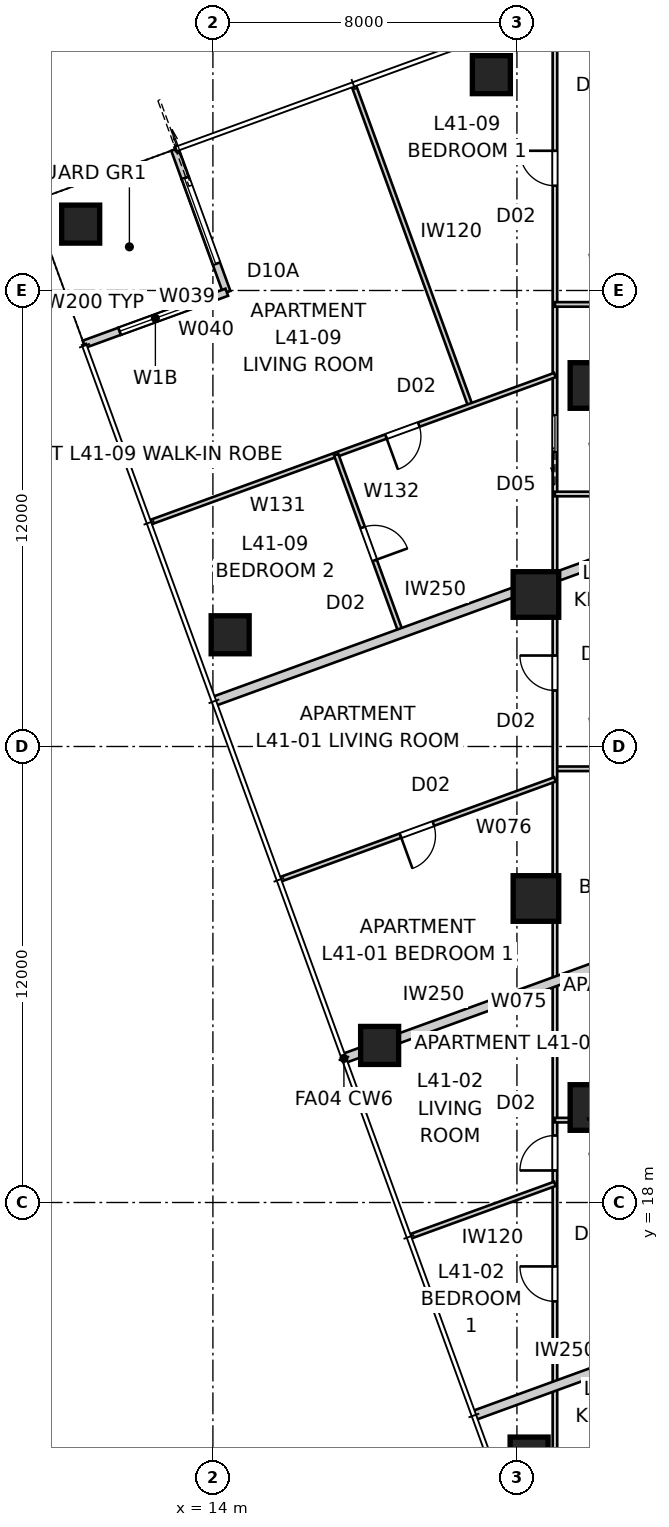
"""IFC4 building model, lengths in metres.
Left out: names, types, materials, properties, quantities, classifications, styles, units other than length and angle.
Written with IfcOpenShell. Run it as: python <this file> out.ifc"""

import sys

from ifc_helpers import new_model, si_unit, direction, frame, frame_2d, origin, origin_2d, place, context, subcontext, project, spatial, rectangle, extrude, element, fill, save


model = new_model("IFC4")
c1 = context("Model", 3, precision=1e-05, world=origin(), true_north=direction((0.0, 1.0)))
c2 = subcontext(c1, "Body", "Model", "MODEL_VIEW")
j1 = project(units=[si_unit("LENGTHUNIT", "METRE"), si_unit("PLANEANGLEUNIT", "RADIAN")], contexts=[c1])
p1 = place(None, origin())
s1 = spatial("IfcSite", under=j1, at=p1, CompositionType="ELEMENT")
p2 = place(p1, origin())
s2 = spatial("IfcBuilding", under=s1, at=p2, CompositionType="ELEMENT")
p3 = place(p2, frame((0.0, 0.0, 150.6)))
s3 = spatial("IfcBuildingStorey", under=s2, at=p3, CompositionType="ELEMENT", Elevation=150.6)
for number, where, z_axis, x_axis in (
    (1, (21.327, 47.68, 0.0), (0.0, 0.0, 1.0), (1.0, 0.0, 0.0)),
    (2, (10.521, 43.747, 0.0), (0.0, 0.0, 1.0), (1.0, 0.0, 0.0)),
    (3, (14.454, 32.94, 0.0), (0.0, 0.0, 1.0), (1.0, 0.0, 0.0)),
    (4, (18.387, 22.134, 0.0), (0.0, 0.0, 1.0), (1.0, 0.0, 0.0)),
    (5, (22.32, 11.327, 0.0), (0.0, 0.0, 1.0), (1.0, 0.0, 0.0)),
):
    element("IfcColumn", number, at=place(p3, frame(where, z_axis=z_axis, x_axis=x_axis)), inside=s3, PredefinedType="COLUMN", context=c2, shape_type="SweptSolid", body=[
        extrude(rectangle(XDim=1.0, YDim=1.0, at=origin_2d()), origin(), (0.0, 0.0, 1.0), 3.4),
    ])
for number, where, z_axis, x_axis in (
    (6, (24.0, 39.5, 0.0), (0.0, 0.0, 1.0), (1.0, 0.0, 0.0)),
    (7, (22.5, 34.0, 0.0), (0.0, 0.0, 1.0), (1.0, 0.0, 0.0)),
    (8, (22.5, 26.0, 0.0), (0.0, 0.0, 1.0), (1.0, 0.0, 0.0)),
    (9, (24.0, 20.5, 0.0), (0.0, 0.0, 1.0), (1.0, 0.0, 0.0)),
):
    element("IfcColumn", number, at=place(p3, frame(where, z_axis=z_axis, x_axis=x_axis)), inside=s3, PredefinedType="COLUMN", context=c2, shape_type="SweptSolid", body=[
        extrude(rectangle(XDim=1.2, YDim=1.2, at=origin_2d()), origin(), (0.0, 0.0, 1.0), 3.4),
    ])
p4 = place(p3, frame((12.998, 45.712, 0.0), z_axis=(0.0, 0.0, 1.0), x_axis=(0.342110593602, -0.939659694648, 0.0)))
e10 = element("IfcWall", 10, at=p4, inside=s3, PredefinedType="SOLIDWALL", context=c2, shape_type="SweptSolid", body=[
    extrude(rectangle(XDim=0.8, YDim=0.2, at=frame_2d((0.4, 0.0))), origin(), (0.0, 0.0, 1.0), 3.25),
])
p5 = place(p3, frame((13.271, 44.96, 0.0), z_axis=(0.0, 0.0, 1.0), x_axis=(0.342018703306, -0.939693144909, 0.0)))
e11 = element("IfcWall", 11, at=p5, inside=s3, PredefinedType="SOLIDWALL", context=c2, shape_type="SweptSolid", body=[
    extrude(rectangle(XDim=3.2, YDim=0.2, at=frame_2d((1.6, 0.0))), origin(), (0.0, 0.0, 1.0), 2.722),
])
p6 = place(p5, origin())
e12 = element("IfcOpeningElement", 12, at=p6, cuts=e11, PredefinedType="OPENING", context=c2, shape_type="SweptSolid", body=[
    extrude(rectangle(XDim=2.4, YDim=2.1, at=frame_2d((1.2, 1.05))), frame((0.0, 0.11, 0.0), z_axis=(0.0, -1.0, 0.0), x_axis=(1.0, 0.0, 0.0)), (0.0, 0.0, 1.0), 0.22),
])
p7 = place(p3, frame((14.366, 41.953, 0.0), z_axis=(0.0, 0.0, 1.0), x_axis=(-0.939712609717, -0.341965219194, 0.0)))
e13 = element("IfcWall", 13, at=p7, inside=s3, PredefinedType="SOLIDWALL", context=c2, shape_type="SweptSolid", body=[
    extrude(rectangle(XDim=3.0, YDim=0.2, at=frame_2d((1.5, 0.0))), origin(), (0.0, 0.0, 1.0), 2.722),
])
p8 = place(p7, frame((1.0, 0.0, 0.45)))
e14 = element("IfcOpeningElement", 14, at=p8, cuts=e13, PredefinedType="OPENING", context=c2, shape_type="SweptSolid", body=[
    extrude(rectangle(XDim=2.0, YDim=1.8, at=frame_2d((1.0, 0.9))), frame((0.0, 0.11, 0.0), z_axis=(0.0, -1.0, 0.0), x_axis=(1.0, 0.0, 0.0)), (0.0, 0.0, 1.0), 0.22),
])
p9 = place(p3, frame((11.547, 40.927, 0.0), z_axis=(0.0, 0.0, 1.0), x_axis=(-0.939686455819, -0.342037080957, 0.0)))
e15 = element("IfcWall", 15, at=p9, inside=s3, PredefinedType="SOLIDWALL", context=c2, shape_type="SweptSolid", body=[
    extrude(rectangle(XDim=1.0, YDim=0.2, at=frame_2d((0.5, 0.0))), origin(), (0.0, 0.0, 1.0), 3.25),
])
p10 = place(p3, frame((14.027, 31.188, 0.0), z_axis=(0.0, 0.0, 1.0), x_axis=(0.939692090592, 0.342021600019, 0.0)))
e16 = element("IfcWall", 16, at=p10, inside=s3, PredefinedType="PARTITIONING", context=c2, shape_type="SweptSolid", body=[
    extrude(rectangle(XDim=12.949, YDim=0.25, at=frame_2d((6.474, 0.0))), origin(), (0.0, 0.0, 1.0), 3.25),
])
p11 = place(p3, frame((17.447, 21.792, 0.0), z_axis=(0.0, 0.0, 1.0), x_axis=(0.939693071685, 0.342018904489, 0.0)))
e17 = element("IfcWall", 17, at=p11, inside=s3, PredefinedType="PARTITIONING", context=c2, shape_type="SweptSolid", body=[
    extrude(rectangle(XDim=9.309, YDim=0.25, at=frame_2d((4.654, 0.0))), origin(), (0.0, 0.0, 1.0), 3.25),
])
p12 = place(p3, frame((20.868, 12.395, 0.0), z_axis=(0.0, 0.0, 1.0), x_axis=(0.939690274876, 0.342026588591, 0.0)))
e18 = element("IfcWall", 18, at=p12, inside=s3, PredefinedType="PARTITIONING", context=c2, shape_type="SweptSolid", body=[
    extrude(rectangle(XDim=5.669, YDim=0.25, at=frame_2d((2.834, 0.0))), origin(), (0.0, 0.0, 1.0), 3.25),
])
p13 = place(p3, frame((26.2, 29.413, 0.0), z_axis=(0.0, 0.0, 1.0), x_axis=(-1.0, 0.0, 0.0)))
e19 = element("IfcWall", 19, at=p13, inside=s3, PredefinedType="PARTITIONING", context=c2, shape_type="SweptSolid", body=[
    extrude(rectangle(XDim=3.2, YDim=0.12, at=frame_2d((1.6, 0.0))), origin(), (0.0, 0.0, 1.0), 3.25),
])
p14 = place(p13, frame((1.12, 0.0, 0.0)))
e20 = element("IfcOpeningElement", 20, at=p14, cuts=e19, PredefinedType="OPENING", context=c2, shape_type="SweptSolid", body=[
    extrude(rectangle(XDim=0.96, YDim=2.1, at=frame_2d((0.48, 1.05))), frame((0.0, 0.07, 0.0), z_axis=(0.0, -1.0, 0.0), x_axis=(1.0, 0.0, 0.0)), (0.0, 0.0, 1.0), 0.14),
])
p15 = place(p3, frame((23.0, 10.8, 0.0), z_axis=(0.0, 0.0, 1.0), x_axis=(0.0, 1.0, 0.0)))
e21 = element("IfcWall", 21, at=p15, inside=s3, PredefinedType="PARTITIONING", context=c2, shape_type="SweptSolid", body=[
    extrude(rectangle(XDim=38.0, YDim=0.12, at=frame_2d((19.0, 0.0))), origin(), (0.0, 0.0, 1.0), 2.55),
])
p16 = place(p15, frame((20.674, 0.0, 0.0)))
e22 = element("IfcOpeningElement", 22, at=p16, cuts=e21, PredefinedType="OPENING", context=c2, shape_type="SweptSolid", body=[
    extrude(rectangle(XDim=0.92, YDim=2.34, at=frame_2d((0.46, 1.17))), frame((0.0, 0.07, 0.0), z_axis=(0.0, -1.0, 0.0), x_axis=(1.0, 0.0, 0.0)), (0.0, 0.0, 1.0), 0.14),
])
p17 = place(p15, frame((4.598, 0.0, 0.0)))
e23 = element("IfcOpeningElement", 23, at=p17, cuts=e21, PredefinedType="OPENING", context=c2, shape_type="SweptSolid", body=[
    extrude(rectangle(XDim=0.92, YDim=2.34, at=frame_2d((0.46, 1.17))), frame((0.0, 0.07, 0.0), z_axis=(0.0, -1.0, 0.0), x_axis=(1.0, 0.0, 0.0)), (0.0, 0.0, 1.0), 0.14),
])
p18 = place(p15, frame((8.043, 0.0, 0.0)))
e24 = element("IfcOpeningElement", 24, at=p18, cuts=e21, PredefinedType="OPENING", context=c2, shape_type="SweptSolid", body=[
    extrude(rectangle(XDim=0.92, YDim=2.34, at=frame_2d((0.46, 1.17))), frame((0.0, 0.07, 0.0), z_axis=(0.0, -1.0, 0.0), x_axis=(1.0, 0.0, 0.0)), (0.0, 0.0, 1.0), 0.14),
])
p19 = place(p15, frame((33.957, 0.0, 0.0)))
e25 = element("IfcOpeningElement", 25, at=p19, cuts=e21, PredefinedType="OPENING", context=c2, shape_type="SweptSolid", body=[
    extrude(rectangle(XDim=0.92, YDim=2.34, at=frame_2d((0.46, 1.17))), frame((0.0, 0.07, 0.0), z_axis=(0.0, -1.0, 0.0), x_axis=(1.0, 0.0, 0.0)), (0.0, 0.0, 1.0), 0.14),
])
p20 = place(p15, frame((26.957, 0.0, 0.0)))
e26 = element("IfcOpeningElement", 26, at=p20, cuts=e21, PredefinedType="OPENING", context=c2, shape_type="SweptSolid", body=[
    extrude(rectangle(XDim=0.96, YDim=2.1, at=frame_2d((0.48, 1.05))), frame((0.0, 0.07, 0.0), z_axis=(0.0, -1.0, 0.0), x_axis=(1.0, 0.0, 0.0)), (0.0, 0.0, 1.0), 0.14),
])
p21 = place(p3, frame((23.0, 29.134, 0.0), z_axis=(0.0, 0.0, 1.0), x_axis=(-0.939685835373, -0.342038785519, 0.0)))
e27 = element("IfcWall", 27, at=p21, inside=s3, PredefinedType="PARTITIONING", context=c2, shape_type="SweptSolid", body=[
    extrude(rectangle(XDim=7.689, YDim=0.12, at=frame_2d((3.844, 0.0))), origin(), (0.0, 0.0, 1.0), 3.25),
])
p22 = place(p21, frame((3.404, 0.0, 0.0)))
e28 = element("IfcOpeningElement", 28, at=p22, cuts=e27, PredefinedType="OPENING", context=c2, shape_type="SweptSolid", body=[
    extrude(rectangle(XDim=0.92, YDim=2.34, at=frame_2d((0.46, 1.17))), frame((0.0, 0.07, 0.0), z_axis=(0.0, -1.0, 0.0), x_axis=(1.0, 0.0, 0.0)), (0.0, 0.0, 1.0), 0.14),
])
p23 = place(p3, frame((23.0, 20.167, 0.0), z_axis=(0.0, 0.0, 1.0), x_axis=(1.0, 0.0, 0.0)))
e29 = element("IfcWall", 29, at=p23, inside=s3, PredefinedType="PARTITIONING", context=c2, shape_type="SweptSolid", body=[
    extrude(rectangle(XDim=3.2, YDim=0.12, at=frame_2d((1.6, 0.0))), origin(), (0.0, 0.0, 1.0), 3.25),
])
p24 = place(p23, frame((1.72, 0.0, 0.0)))
e30 = element("IfcOpeningElement", 30, at=p24, cuts=e29, PredefinedType="OPENING", context=c2, shape_type="SweptSolid", body=[
    extrude(rectangle(XDim=0.96, YDim=2.1, at=frame_2d((0.48, 1.05))), frame((0.0, 0.07, 0.0), z_axis=(0.0, -1.0, 0.0), x_axis=(1.0, 0.0, 0.0)), (0.0, 0.0, 1.0), 0.14),
])
p25 = place(p3, frame((23.0, 18.492, 0.0), z_axis=(0.0, 0.0, 1.0), x_axis=(-0.939682468191, -0.342048036063, 0.0)))
e31 = element("IfcWall", 31, at=p25, inside=s3, PredefinedType="PARTITIONING", context=c2, shape_type="SweptSolid", body=[
    extrude(rectangle(XDim=4.049, YDim=0.12, at=frame_2d((2.024, 0.0))), origin(), (0.0, 0.0, 1.0), 3.25),
])
p26 = place(p3, frame((26.2, 41.634, 0.0), z_axis=(0.0, 0.0, 1.0), x_axis=(-1.0, 0.0, 0.0)))
e32 = element("IfcWall", 32, at=p26, inside=s3, PredefinedType="PARTITIONING", context=c2, shape_type="SweptSolid", body=[
    extrude(rectangle(XDim=3.2, YDim=0.12, at=frame_2d((1.6, 0.0))), origin(), (0.0, 0.0, 1.0), 3.25),
])
p27 = place(p26, frame((1.12, 0.0, 0.0)))
e33 = element("IfcOpeningElement", 33, at=p27, cuts=e32, PredefinedType="OPENING", context=c2, shape_type="SweptSolid", body=[
    extrude(rectangle(XDim=0.96, YDim=2.1, at=frame_2d((0.48, 1.05))), frame((0.0, 0.07, 0.0), z_axis=(0.0, -1.0, 0.0), x_axis=(1.0, 0.0, 0.0)), (0.0, 0.0, 1.0), 0.14),
])
p28 = place(p3, frame((26.2, 36.645, 0.0), z_axis=(0.0, 0.0, 1.0), x_axis=(-1.0, 0.0, 0.0)))
e34 = element("IfcWall", 34, at=p28, inside=s3, PredefinedType="PARTITIONING", context=c2, shape_type="SweptSolid", body=[
    extrude(rectangle(XDim=3.2, YDim=0.12, at=frame_2d((1.6, 0.0))), origin(), (0.0, 0.0, 1.0), 3.25),
])
p29 = place(p28, frame((1.12, 0.0, 0.0)))
e35 = element("IfcOpeningElement", 35, at=p29, cuts=e34, PredefinedType="OPENING", context=c2, shape_type="SweptSolid", body=[
    extrude(rectangle(XDim=0.96, YDim=2.1, at=frame_2d((0.48, 1.05))), frame((0.0, 0.07, 0.0), z_axis=(0.0, -1.0, 0.0), x_axis=(1.0, 0.0, 0.0)), (0.0, 0.0, 1.0), 0.14),
])
p30 = place(p3, frame((17.71, 47.385, 0.0), z_axis=(0.0, 0.0, 1.0), x_axis=(0.342038393654, -0.939685978009, 0.0)))
e36 = element("IfcWall", 36, at=p30, inside=s3, PredefinedType="PARTITIONING", context=c2, shape_type="SweptSolid", body=[
    extrude(rectangle(XDim=8.96, YDim=0.12, at=frame_2d((4.48, 0.0))), origin(), (0.0, 0.0, 1.0), 3.25),
])
p31 = place(p3, frame((23.0, 39.775, 0.0), z_axis=(0.0, 0.0, 1.0), x_axis=(-0.939693965364, -0.342016449105, 0.0)))
e37 = element("IfcWall", 37, at=p31, inside=s3, PredefinedType="PARTITIONING", context=c2, shape_type="SweptSolid", body=[
    extrude(rectangle(XDim=11.328, YDim=0.12, at=frame_2d((5.664, 0.0))), origin(), (0.0, 0.0, 1.0), 3.25),
])
p32 = place(p31, frame((3.812, 0.0, 0.0)))
e38 = element("IfcOpeningElement", 38, at=p32, cuts=e37, PredefinedType="OPENING", context=c2, shape_type="SweptSolid", body=[
    extrude(rectangle(XDim=0.92, YDim=2.34, at=frame_2d((0.46, 1.17))), frame((0.0, 0.07, 0.0), z_axis=(0.0, -1.0, 0.0), x_axis=(1.0, 0.0, 0.0)), (0.0, 0.0, 1.0), 0.14),
])
p33 = place(p3, frame((17.243, 37.68, 0.0), z_axis=(0.0, 0.0, 1.0), x_axis=(0.341993964619, -0.939702148643, 0.0)))
e39 = element("IfcWall", 39, at=p33, inside=s3, PredefinedType="PARTITIONING", context=c2, shape_type="SweptSolid", body=[
    extrude(rectangle(XDim=5.0, YDim=0.12, at=frame_2d((2.5, 0.0))), origin(), (0.0, 0.0, 1.0), 3.25),
])
p34 = place(p33, frame((2.04, 0.0, 0.0)))
e40 = element("IfcOpeningElement", 40, at=p34, cuts=e39, PredefinedType="OPENING", context=c2, shape_type="SweptSolid", body=[
    extrude(rectangle(XDim=0.92, YDim=2.34, at=frame_2d((0.46, 1.17))), frame((0.0, 0.07, 0.0), z_axis=(0.0, -1.0, 0.0), x_axis=(1.0, 0.0, 0.0)), (0.0, 0.0, 1.0), 0.14),
])
p35 = place(p6, origin())
e41 = element("IfcDoor", 41, at=p35, inside=s3, OperationType="SLIDING_TO_LEFT", PredefinedType="DOOR", context=c2, shape_type="SweptSolid", body=[
    extrude(rectangle(XDim=2.4, YDim=2.1, at=frame_2d((1.2, 1.05))), frame((0.0, 0.025, 0.0), z_axis=(0.0, -1.0, 0.0), x_axis=(1.0, 0.0, 0.0)), (0.0, 0.0, 1.0), 0.05),
])
fill(e12, e41)
p36 = place(p8, origin())
e42 = element("IfcWindow", 42, at=p36, inside=s3, PartitioningType="SINGLE_PANEL", PredefinedType="WINDOW", context=c2, shape_type="SweptSolid", body=[
    extrude(rectangle(XDim=2.0, YDim=1.8, at=frame_2d((1.0, 0.9))), frame((0.0, 0.03, 0.0), z_axis=(0.0, -1.0, 0.0), x_axis=(1.0, 0.0, 0.0)), (0.0, 0.0, 1.0), 0.06),
])
fill(e14, e42)
p37 = place(p16, origin())
e43 = element("IfcDoor", 43, at=p37, inside=s3, OperationType="SINGLE_SWING_RIGHT", PredefinedType="DOOR", context=c2, shape_type="SweptSolid", body=[
    extrude(rectangle(XDim=0.92, YDim=2.34, at=frame_2d((0.46, 1.17))), frame((0.0, 0.025, 0.0), z_axis=(0.0, -1.0, 0.0), x_axis=(1.0, 0.0, 0.0)), (0.0, 0.0, 1.0), 0.05),
])
fill(e22, e43)
p38 = place(p17, origin())
e44 = element("IfcDoor", 44, at=p38, inside=s3, OperationType="SINGLE_SWING_RIGHT", PredefinedType="DOOR", context=c2, shape_type="SweptSolid", body=[
    extrude(rectangle(XDim=0.92, YDim=2.34, at=frame_2d((0.46, 1.17))), frame((0.0, 0.025, 0.0), z_axis=(0.0, -1.0, 0.0), x_axis=(1.0, 0.0, 0.0)), (0.0, 0.0, 1.0), 0.05),
])
fill(e23, e44)
p39 = place(p18, origin())
e45 = element("IfcDoor", 45, at=p39, inside=s3, OperationType="SINGLE_SWING_LEFT", PredefinedType="DOOR", context=c2, shape_type="SweptSolid", body=[
    extrude(rectangle(XDim=0.92, YDim=2.34, at=frame_2d((0.46, 1.17))), frame((0.0, 0.025, 0.0), z_axis=(0.0, -1.0, 0.0), x_axis=(1.0, 0.0, 0.0)), (0.0, 0.0, 1.0), 0.05),
])
fill(e24, e45)
p40 = place(p19, origin())
e46 = element("IfcDoor", 46, at=p40, inside=s3, OperationType="SINGLE_SWING_RIGHT", PredefinedType="DOOR", context=c2, shape_type="SweptSolid", body=[
    extrude(rectangle(XDim=0.92, YDim=2.34, at=frame_2d((0.46, 1.17))), frame((0.0, 0.025, 0.0), z_axis=(0.0, -1.0, 0.0), x_axis=(1.0, 0.0, 0.0)), (0.0, 0.0, 1.0), 0.05),
])
fill(e25, e46)
p41 = place(p22, origin())
e47 = element("IfcDoor", 47, at=p41, inside=s3, OperationType="SINGLE_SWING_RIGHT", PredefinedType="DOOR", context=c2, shape_type="SweptSolid", body=[
    extrude(rectangle(XDim=0.92, YDim=2.34, at=frame_2d((0.46, 1.17))), frame((0.0, 0.025, 0.0), z_axis=(0.0, -1.0, 0.0), x_axis=(1.0, 0.0, 0.0)), (0.0, 0.0, 1.0), 0.05),
])
fill(e28, e47)
p42 = place(p20, origin())
e48 = element("IfcDoor", 48, at=p42, inside=s3, OperationType="SLIDING_TO_LEFT", PredefinedType="DOOR", context=c2, shape_type="SweptSolid", body=[
    extrude(rectangle(XDim=0.96, YDim=2.1, at=frame_2d((0.48, 1.05))), frame((0.0, 0.025, 0.0), z_axis=(0.0, -1.0, 0.0), x_axis=(1.0, 0.0, 0.0)), (0.0, 0.0, 1.0), 0.05),
])
fill(e26, e48)
p43 = place(p34, origin())
e49 = element("IfcDoor", 49, at=p43, inside=s3, OperationType="SINGLE_SWING_RIGHT", PredefinedType="DOOR", context=c2, shape_type="SweptSolid", body=[
    extrude(rectangle(XDim=0.92, YDim=2.34, at=frame_2d((0.46, 1.17))), frame((0.0, 0.025, 0.0), z_axis=(0.0, -1.0, 0.0), x_axis=(1.0, 0.0, 0.0)), (0.0, 0.0, 1.0), 0.05),
])
fill(e40, e49)
p44 = place(p32, origin())
e50 = element("IfcDoor", 50, at=p44, inside=s3, OperationType="SINGLE_SWING_RIGHT", PredefinedType="DOOR", context=c2, shape_type="SweptSolid", body=[
    extrude(rectangle(XDim=0.92, YDim=2.34, at=frame_2d((0.46, 1.17))), frame((0.0, 0.025, 0.0), z_axis=(0.0, -1.0, 0.0), x_axis=(1.0, 0.0, 0.0)), (0.0, 0.0, 1.0), 0.05),
])
fill(e38, e50)
save(model, sys.argv[1])
